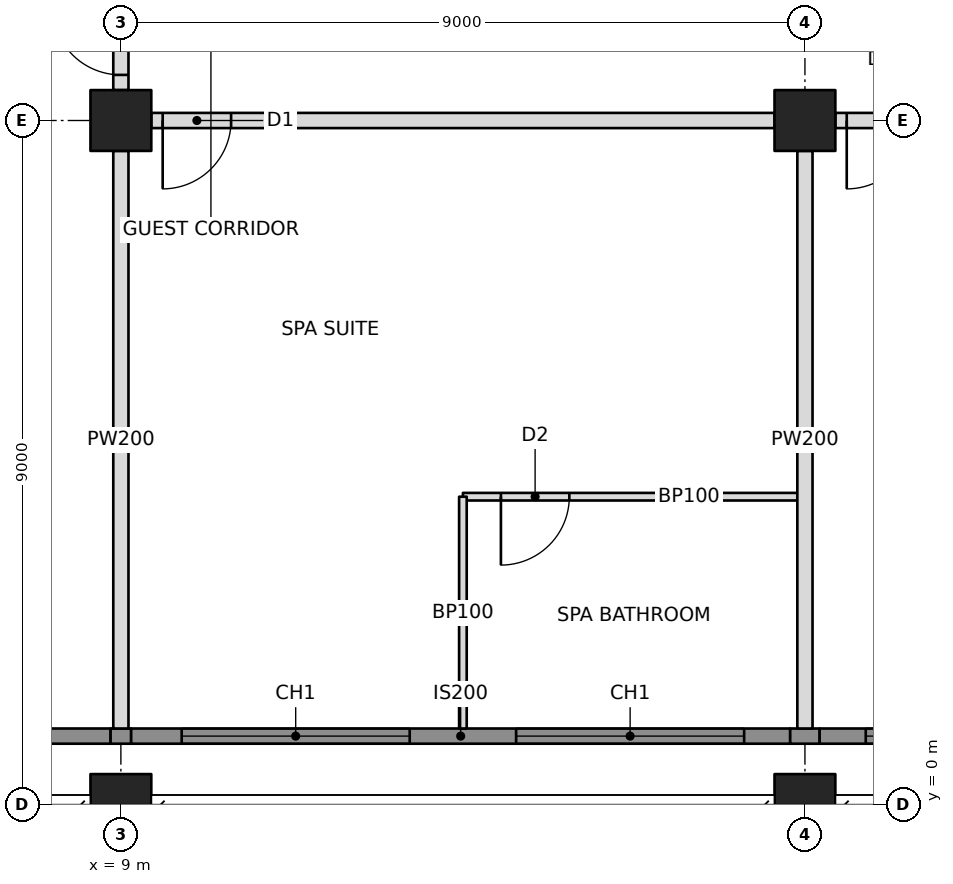
"""IFC4 building model, lengths in metres.
Left out: names, types, materials, properties, quantities, classifications, styles, units other than length and angle.
Written with IfcOpenShell. Run it as: python <this file> out.ifc"""

import sys

from ifc_helpers import new_model, si_unit, direction, frame, frame_2d, origin, origin_2d, place, context, subcontext, project, spatial, rectangle, hollow_rectangle, extrude, element, fill, save


model = new_model("IFC4")
c1 = context("Model", 3, precision=1e-05, world=origin(), true_north=direction((0.0, 1.0)))
c2 = subcontext(c1, "Body", "Model", "MODEL_VIEW")
j1 = project(units=[si_unit("LENGTHUNIT", "METRE"), si_unit("PLANEANGLEUNIT", "RADIAN")], contexts=[c1])
p1 = place(None, origin())
s1 = spatial("IfcSite", under=j1, at=p1, CompositionType="ELEMENT")
p2 = place(p1, origin())
s2 = spatial("IfcBuilding", under=s1, at=p2, CompositionType="ELEMENT")
p3 = place(p2, frame((0.0, 0.0, 248.2)))
s3 = spatial("IfcBuildingStorey", under=s2, at=p3, CompositionType="ELEMENT", Elevation=248.2)
for number, where, z_axis, x_axis in (
    (1, (9.0, 0.0, 0.0), (0.0, 0.0, 1.0), (1.0, 0.0, 0.0)),
    (2, (9.0, 9.0, 0.0), (0.0, 0.0, 1.0), (1.0, 0.0, 0.0)),
    (3, (18.0, 0.0, 0.0), (0.0, 0.0, 1.0), (1.0, 0.0, 0.0)),
    (4, (18.0, 9.0, 0.0), (0.0, 0.0, 1.0), (1.0, 0.0, 0.0)),
):
    element("IfcColumn", number, at=place(p3, frame(where, z_axis=z_axis, x_axis=x_axis)), inside=s3, PredefinedType="COLUMN", context=c2, shape_type="SweptSolid", body=[
        extrude(hollow_rectangle(XDim=0.8, YDim=0.8, WallThickness=0.032, at=origin_2d()), origin(), (0.0, 0.0, 1.0), 3.6),
    ])
p4 = place(p3, frame((3.0, 0.9, 0.0), z_axis=(0.0, 0.0, 1.0), x_axis=(1.0, 0.0, 0.0)))
e5 = element("IfcWall", 5, at=p4, inside=s3, PredefinedType="SOLIDWALL", context=c2, shape_type="SweptSolid", body=[
    extrude(rectangle(XDim=5.865, YDim=0.2, at=frame_2d((2.932, 0.0))), origin(), (0.0, 0.0, 1.0), 3.4),
])
p5 = place(p4, frame((1.45, 0.0, 0.6)))
e6 = element("IfcOpeningElement", 6, at=p5, cuts=e5, PredefinedType="OPENING", context=c2, shape_type="SweptSolid", body=[
    extrude(rectangle(XDim=3.0, YDim=2.2, at=frame_2d((1.5, 1.1))), frame((0.0, 0.11, 0.0), z_axis=(0.0, -1.0, 0.0), x_axis=(1.0, 0.0, 0.0)), (0.0, 0.0, 1.0), 0.22),
])
p6 = place(p3, frame((9.4, 9.0, 0.0), z_axis=(0.0, 0.0, 1.0), x_axis=(1.0, 0.0, 0.0)))
e7 = element("IfcWall", 7, at=p6, inside=s3, PredefinedType="PARTITIONING", context=c2, shape_type="SweptSolid", body=[
    extrude(rectangle(XDim=8.2, YDim=0.2, at=frame_2d((4.1, 0.0))), origin(), (0.0, 0.0, 1.0), 2.605),
])
p7 = place(p6, frame((0.15, 0.0, 0.0)))
e8 = element("IfcOpeningElement", 8, at=p7, cuts=e7, PredefinedType="OPENING", context=c2, shape_type="SweptSolid", body=[
    extrude(rectangle(XDim=0.9, YDim=2.1, at=frame_2d((0.45, 1.05))), frame((0.0, 0.11, 0.0), z_axis=(0.0, -1.0, 0.0), x_axis=(1.0, 0.0, 0.0)), (0.0, 0.0, 1.0), 0.22),
])
p8 = place(p3, frame((18.4, 9.0, 0.0), z_axis=(0.0, 0.0, 1.0), x_axis=(1.0, 0.0, 0.0)))
e9 = element("IfcWall", 9, at=p8, inside=s3, PredefinedType="PARTITIONING", context=c2, shape_type="SweptSolid", body=[
    extrude(rectangle(XDim=8.2, YDim=0.2, at=frame_2d((4.1, 0.0))), origin(), (0.0, 0.0, 1.0), 2.605),
])
p9 = place(p8, frame((0.15, 0.0, 0.0)))
e10 = element("IfcOpeningElement", 10, at=p9, cuts=e9, PredefinedType="OPENING", context=c2, shape_type="SweptSolid", body=[
    extrude(rectangle(XDim=0.9, YDim=2.1, at=frame_2d((0.45, 1.05))), frame((0.0, 0.11, 0.0), z_axis=(0.0, -1.0, 0.0), x_axis=(1.0, 0.0, 0.0)), (0.0, 0.0, 1.0), 0.22),
])
p10 = place(p3, frame((9.0, 8.6, 0.0), z_axis=(0.0, 0.0, 1.0), x_axis=(0.0, -1.0, 0.0)))
e11 = element("IfcWall", 11, at=p10, inside=s3, PredefinedType="PARTITIONING", context=c2, shape_type="SweptSolid", body=[
    extrude(rectangle(XDim=7.6, YDim=0.2, at=frame_2d((3.8, 0.0))), origin(), (0.0, 0.0, 1.0), 2.638),
])
p11 = place(p3, frame((18.0, 8.6, 0.0), z_axis=(0.0, 0.0, 1.0), x_axis=(0.0, -1.0, 0.0)))
e12 = element("IfcWall", 12, at=p11, inside=s3, PredefinedType="PARTITIONING", context=c2, shape_type="SweptSolid", body=[
    extrude(rectangle(XDim=7.6, YDim=0.2, at=frame_2d((3.8, 0.0))), origin(), (0.0, 0.0, 1.0), 2.605),
])
p12 = place(p3, frame((13.5, 4.05, 0.0), z_axis=(0.0, 0.0, 1.0), x_axis=(1.0, 0.0, 0.0)))
e13 = element("IfcWall", 13, at=p12, inside=s3, PredefinedType="PARTITIONING", context=c2, shape_type="SweptSolid", body=[
    extrude(rectangle(XDim=4.4, YDim=0.1, at=frame_2d((2.2, 0.0))), origin(), (0.0, 0.0, 1.0), 2.604),
])
p13 = place(p12, frame((0.5, 0.0, 0.0)))
e14 = element("IfcOpeningElement", 14, at=p13, cuts=e13, PredefinedType="OPENING", context=c2, shape_type="SweptSolid", body=[
    extrude(rectangle(XDim=0.9, YDim=2.1, at=frame_2d((0.45, 1.05))), frame((0.0, 0.06, 0.0), z_axis=(0.0, -1.0, 0.0), x_axis=(1.0, 0.0, 0.0)), (0.0, 0.0, 1.0), 0.12),
])
p14 = place(p3, frame((13.5, 4.05, 0.0), z_axis=(0.0, 0.0, 1.0), x_axis=(0.0, -1.0, 0.0)))
e15 = element("IfcWall", 15, at=p14, inside=s3, PredefinedType="PARTITIONING", context=c2, shape_type="SweptSolid", body=[
    extrude(rectangle(XDim=3.05, YDim=0.1, at=frame_2d((1.525, 0.0))), origin(), (0.0, 0.0, 1.0), 3.4),
])
p15 = place(p3, frame((9.0, 9.4, 0.0), z_axis=(0.0, 0.0, 1.0), x_axis=(0.0, 1.0, 0.0)))
e16 = element("IfcWall", 16, at=p15, inside=s3, PredefinedType="PARTITIONING", context=c2, shape_type="SweptSolid", body=[
    extrude(rectangle(XDim=1.3, YDim=0.2, at=frame_2d((0.65, 0.0))), origin(), (0.0, 0.0, 1.0), 2.605),
])
p16 = place(p15, frame((0.2, 0.0, 0.0)))
e17 = element("IfcOpeningElement", 17, at=p16, cuts=e16, PredefinedType="OPENING", context=c2, shape_type="SweptSolid", body=[
    extrude(rectangle(XDim=0.9, YDim=2.1, at=frame_2d((0.45, 1.05))), frame((0.0, 0.11, 0.0), z_axis=(0.0, -1.0, 0.0), x_axis=(1.0, 0.0, 0.0)), (0.0, 0.0, 1.0), 0.22),
])
p17 = place(p3, frame((8.865, 0.9, 0.0), z_axis=(0.0, 0.0, 1.0), x_axis=(1.0, 0.0, 0.0)))
e18 = element("IfcWall", 18, at=p17, inside=s3, PredefinedType="SOLIDWALL", context=c2, shape_type="SweptSolid", body=[
    extrude(rectangle(XDim=0.271, YDim=0.2, at=frame_2d((0.135, 0.0))), origin(), (0.0, 0.0, 1.0), 2.638),
])
p18 = place(p3, frame((9.135, 0.9, 0.0), z_axis=(0.0, 0.0, 1.0), x_axis=(1.0, 0.0, 0.0)))
e19 = element("IfcWall", 19, at=p18, inside=s3, PredefinedType="SOLIDWALL", context=c2, shape_type="SweptSolid", body=[
    extrude(rectangle(XDim=8.671, YDim=0.2, at=frame_2d((4.335, 0.0))), origin(), (0.0, 0.0, 1.0), 3.4),
])
p19 = place(p18, frame((0.665, 0.0, 0.6)))
e20 = element("IfcOpeningElement", 20, at=p19, cuts=e19, PredefinedType="OPENING", context=c2, shape_type="SweptSolid", body=[
    extrude(rectangle(XDim=3.0, YDim=2.2, at=frame_2d((1.5, 1.1))), frame((0.0, 0.11, 0.0), z_axis=(0.0, -1.0, 0.0), x_axis=(1.0, 0.0, 0.0)), (0.0, 0.0, 1.0), 0.22),
])
p20 = place(p18, frame((5.065, 0.0, 0.6)))
e21 = element("IfcOpeningElement", 21, at=p20, cuts=e19, PredefinedType="OPENING", context=c2, shape_type="SweptSolid", body=[
    extrude(rectangle(XDim=3.0, YDim=2.2, at=frame_2d((1.5, 1.1))), frame((0.0, 0.11, 0.0), z_axis=(0.0, -1.0, 0.0), x_axis=(1.0, 0.0, 0.0)), (0.0, 0.0, 1.0), 0.22),
])
p21 = place(p3, frame((17.806, 0.9, 0.0), z_axis=(0.0, 0.0, 1.0), x_axis=(1.0, 0.0, 0.0)))
e22 = element("IfcWall", 22, at=p21, inside=s3, PredefinedType="SOLIDWALL", context=c2, shape_type="SweptSolid", body=[
    extrude(rectangle(XDim=0.388, YDim=0.2, at=frame_2d((0.194, 0.0))), origin(), (0.0, 0.0, 1.0), 2.604),
])
p22 = place(p3, frame((18.194, 0.9, 0.0), z_axis=(0.0, 0.0, 1.0), x_axis=(1.0, 0.0, 0.0)))
e23 = element("IfcWall", 23, at=p22, inside=s3, PredefinedType="SOLIDWALL", context=c2, shape_type="SweptSolid", body=[
    extrude(rectangle(XDim=8.612, YDim=0.2, at=frame_2d((4.306, 0.0))), origin(), (0.0, 0.0, 1.0), 3.4),
])
p23 = place(p22, frame((0.606, 0.0, 0.6)))
e24 = element("IfcOpeningElement", 24, at=p23, cuts=e23, PredefinedType="OPENING", context=c2, shape_type="SweptSolid", body=[
    extrude(rectangle(XDim=3.0, YDim=2.2, at=frame_2d((1.5, 1.1))), frame((0.0, 0.11, 0.0), z_axis=(0.0, -1.0, 0.0), x_axis=(1.0, 0.0, 0.0)), (0.0, 0.0, 1.0), 0.22),
])
p24 = place(p22, frame((5.006, 0.0, 0.6)))
e25 = element("IfcOpeningElement", 25, at=p24, cuts=e23, PredefinedType="OPENING", context=c2, shape_type="SweptSolid", body=[
    extrude(rectangle(XDim=3.0, YDim=2.2, at=frame_2d((1.5, 1.1))), frame((0.0, 0.11, 0.0), z_axis=(0.0, -1.0, 0.0), x_axis=(1.0, 0.0, 0.0)), (0.0, 0.0, 1.0), 0.22),
])
p25 = place(p19, origin())
e26 = element("IfcWindow", 26, at=p25, inside=s3, PartitioningType="TRIPLE_PANEL_VERTICAL", PredefinedType="WINDOW", context=c2, shape_type="SweptSolid", body=[
    extrude(rectangle(XDim=3.0, YDim=2.2, at=frame_2d((1.5, 1.1))), frame((0.0, 0.03, 0.0), z_axis=(0.0, -1.0, 0.0), x_axis=(1.0, 0.0, 0.0)), (0.0, 0.0, 1.0), 0.06),
])
fill(e20, e26)
p26 = place(p20, origin())
e27 = element("IfcWindow", 27, at=p26, inside=s3, PartitioningType="TRIPLE_PANEL_VERTICAL", PredefinedType="WINDOW", context=c2, shape_type="SweptSolid", body=[
    extrude(rectangle(XDim=3.0, YDim=2.2, at=frame_2d((1.5, 1.1))), frame((0.0, 0.03, 0.0), z_axis=(0.0, -1.0, 0.0), x_axis=(1.0, 0.0, 0.0)), (0.0, 0.0, 1.0), 0.06),
])
fill(e21, e27)
p27 = place(p23, origin())
e28 = element("IfcWindow", 28, at=p27, inside=s3, PartitioningType="TRIPLE_PANEL_VERTICAL", PredefinedType="WINDOW", context=c2, shape_type="SweptSolid", body=[
    extrude(rectangle(XDim=3.0, YDim=2.2, at=frame_2d((1.5, 1.1))), frame((0.0, 0.03, 0.0), z_axis=(0.0, -1.0, 0.0), x_axis=(1.0, 0.0, 0.0)), (0.0, 0.0, 1.0), 0.06),
])
fill(e24, e28)
p28 = place(p13, frame((0.9, 0.0, 0.0), z_axis=(0.0, 0.0, 1.0), x_axis=(-1.0, 0.0, 0.0)))
e29 = element("IfcDoor", 29, at=p28, inside=s3, OperationType="SINGLE_SWING_RIGHT", PredefinedType="DOOR", context=c2, shape_type="SweptSolid", body=[
    extrude(rectangle(XDim=0.9, YDim=2.1, at=frame_2d((0.45, 1.05))), frame((0.0, 0.025, 0.0), z_axis=(0.0, -1.0, 0.0), x_axis=(1.0, 0.0, 0.0)), (0.0, 0.0, 1.0), 0.05),
])
fill(e14, e29)
p29 = place(p7, frame((0.9, 0.0, 0.0), z_axis=(0.0, 0.0, 1.0), x_axis=(-1.0, 0.0, 0.0)))
e30 = element("IfcDoor", 30, at=p29, inside=s3, OperationType="SINGLE_SWING_RIGHT", PredefinedType="DOOR", context=c2, shape_type="SweptSolid", body=[
    extrude(rectangle(XDim=0.9, YDim=2.1, at=frame_2d((0.45, 1.05))), frame((0.0, 0.025, 0.0), z_axis=(0.0, -1.0, 0.0), x_axis=(1.0, 0.0, 0.0)), (0.0, 0.0, 1.0), 0.05),
])
fill(e8, e30)
p30 = place(p9, frame((0.9, 0.0, 0.0), z_axis=(0.0, 0.0, 1.0), x_axis=(-1.0, 0.0, 0.0)))
e31 = element("IfcDoor", 31, at=p30, inside=s3, OperationType="SINGLE_SWING_RIGHT", PredefinedType="DOOR", context=c2, shape_type="SweptSolid", body=[
    extrude(rectangle(XDim=0.9, YDim=2.1, at=frame_2d((0.45, 1.05))), frame((0.0, 0.025, 0.0), z_axis=(0.0, -1.0, 0.0), x_axis=(1.0, 0.0, 0.0)), (0.0, 0.0, 1.0), 0.05),
])
fill(e10, e31)
p31 = place(p16, origin())
e32 = element("IfcDoor", 32, at=p31, inside=s3, OperationType="SINGLE_SWING_RIGHT", PredefinedType="DOOR", context=c2, shape_type="SweptSolid", body=[
    extrude(rectangle(XDim=0.9, YDim=2.1, at=frame_2d((0.45, 1.05))), frame((0.0, 0.025, 0.0), z_axis=(0.0, -1.0, 0.0), x_axis=(1.0, 0.0, 0.0)), (0.0, 0.0, 1.0), 0.05),
])
fill(e17, e32)
save(model, sys.argv[1])
